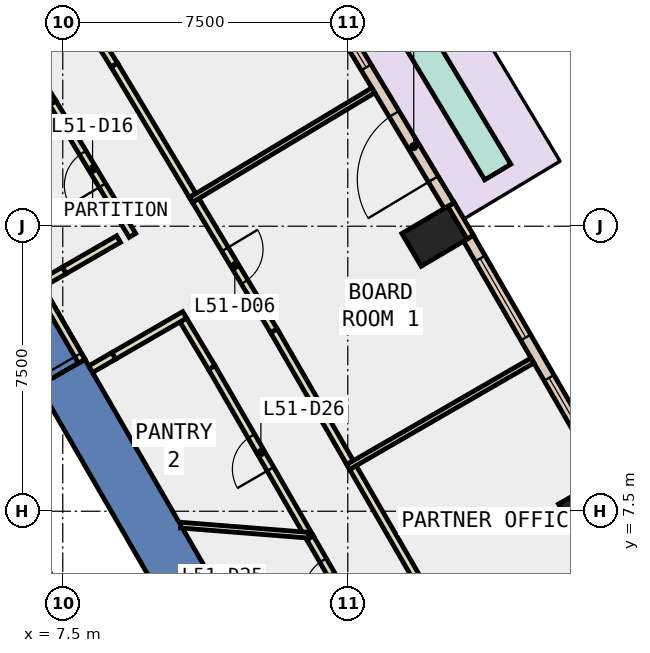
"""IFC4 building model, lengths in metres.
Left out: names, types, materials, properties, quantities, classifications, styles, units other than length and angle.
Written with IfcOpenShell. Run it as: python <this file> out.ifc"""

import sys

from ifc_helpers import new_model, si_unit, direction, frame, frame_2d, origin, origin_2d, place, context, subcontext, project, spatial, polyline, rectangle, outline, extrude, element, fill, save


model = new_model("IFC4")
c1 = context("Model", 3, precision=1e-05, world=origin(), true_north=direction((0.0, 1.0)))
c2 = subcontext(c1, "Body", "Model", "MODEL_VIEW")
j1 = project(units=[si_unit("LENGTHUNIT", "METRE"), si_unit("PLANEANGLEUNIT", "RADIAN")], contexts=[c1])
p1 = place(None, origin())
s1 = spatial("IfcSite", under=j1, at=p1, CompositionType="ELEMENT")
p2 = place(p1, origin())
s2 = spatial("IfcBuilding", under=s1, at=p2, CompositionType="ELEMENT")
p3 = place(p2, frame((0.0, 0.0, 227.6)))
s3 = spatial("IfcBuildingStorey", under=s2, at=p3, CompositionType="ELEMENT", Elevation=227.6)
for number, where, z_axis, x_axis in (
    (1, (21.4, 7.599, -0.4), (0.0, 0.0, 1.0), (-0.491, 0.871, 0.0)),
    (2, (17.28, 14.733, -0.4), (0.0, 0.0, 1.0), (-0.509, 0.861, 0.0)),
):
    element("IfcColumn", number, at=place(p3, frame(where, z_axis=z_axis, x_axis=x_axis)), inside=s3, PredefinedType="COLUMN", context=c2, shape_type="SweptSolid", body=[
        extrude(rectangle(XDim=1.0, YDim=1.4, at=origin_2d()), origin(), (0.0, 0.0, 1.0), 4.2),
    ])
p4 = place(p3, frame((0.0, 0.0, -0.4)))
e3 = element("IfcWall", 3, at=p4, inside=s3, PredefinedType="SHEAR", context=c2, shape_type="SweptSolid", body=[
    extrude(outline(polyline([(8.084, 11.498), (6.871, 10.798), (11.662, 2.5), (13.279, 2.5), (8.084, 11.498)])), origin(), (0.0, 0.0, 1.0), 4.2),
])
p5 = place(p3, frame((0.0, 0.0, 3.6)))
e4 = element("IfcWall", 4, at=p5, inside=s3, PredefinedType="SHEAR", context=c2, shape_type="SweptSolid", body=[
    extrude(outline(polyline([(7.084, 13.23), (5.871, 12.53), (6.871, 10.798), (8.084, 11.498), (7.084, 13.23)])), origin(), (0.0, 0.0, 1.0), 0.2),
])
p6 = place(p3, frame((18.223, 14.71, 0.0), z_axis=(0.0, 0.0, 1.0), x_axis=(-0.507980373775, 0.861368643416, 0.0)))
e5 = element("IfcWall", 5, at=p6, inside=s3, PredefinedType="STANDARD", context=c2, shape_type="SweptSolid", body=[
    extrude(rectangle(XDim=1.0, YDim=0.2, at=frame_2d((0.5, 0.0))), origin(), (0.0, 0.0, 1.0), 3.8),
])
p7 = place(p3, frame((21.804, 8.399, 0.0), z_axis=(0.0, 0.0, 1.0), x_axis=(-0.500075798504, 0.865981637075, 0.0)))
e6 = element("IfcWall", 6, at=p7, inside=s3, PredefinedType="STANDARD", context=c2, shape_type="SweptSolid", body=[
    extrude(rectangle(XDim=7.257, YDim=0.3, at=frame_2d((3.628, 0.0))), origin(), (0.0, 0.0, 1.0), 3.8),
])
p8 = place(p7, frame((0.614, 0.0, 0.9)))
e7 = element("IfcOpeningElement", 7, at=p8, cuts=e6, PredefinedType="OPENING", context=c2, shape_type="SweptSolid", body=[
    extrude(rectangle(XDim=2.4, YDim=2.6, at=frame_2d((1.2, 1.3))), frame((0.0, 0.16, 0.0), z_axis=(0.0, -1.0, 0.0), x_axis=(1.0, 0.0, 0.0)), (0.0, 0.0, 1.0), 0.32),
])
p9 = place(p7, frame((4.242, 0.0, 0.9)))
e8 = element("IfcOpeningElement", 8, at=p9, cuts=e6, PredefinedType="OPENING", context=c2, shape_type="SweptSolid", body=[
    extrude(rectangle(XDim=2.4, YDim=2.6, at=frame_2d((1.2, 1.3))), frame((0.0, 0.16, 0.0), z_axis=(0.0, -1.0, 0.0), x_axis=(1.0, 0.0, 0.0)), (0.0, 0.0, 1.0), 0.32),
])
p10 = place(p3, frame((17.669, 15.542, 0.0), z_axis=(0.0, 0.0, 1.0), x_axis=(-0.515049705348, 0.857160312323, 0.0)))
e9 = element("IfcWall", 9, at=p10, inside=s3, PredefinedType="STANDARD", context=c2, shape_type="SweptSolid", body=[
    extrude(rectangle(XDim=7.258, YDim=0.3, at=frame_2d((3.629, 0.0))), origin(), (0.0, 0.0, 1.0), 3.8),
])
p11 = place(p10, frame((0.814, 0.0, 0.0)))
e10 = element("IfcOpeningElement", 10, at=p11, cuts=e9, PredefinedType="OPENING", context=c2, shape_type="SweptSolid", body=[
    extrude(rectangle(XDim=2.0, YDim=2.4, at=frame_2d((1.0, 1.2))), frame((0.0, 0.16, 0.0), z_axis=(0.0, -1.0, 0.0), x_axis=(1.0, 0.0, 0.0)), (0.0, 0.0, 1.0), 0.32),
])
p12 = place(p10, frame((4.243, 0.0, 0.9)))
e11 = element("IfcOpeningElement", 11, at=p12, cuts=e9, PredefinedType="OPENING", context=c2, shape_type="SweptSolid", body=[
    extrude(rectangle(XDim=2.4, YDim=2.6, at=frame_2d((1.2, 1.3))), frame((0.0, 0.16, 0.0), z_axis=(0.0, -1.0, 0.0), x_axis=(1.0, 0.0, 0.0)), (0.0, 0.0, 1.0), 0.32),
])
p13 = place(p3, frame((18.946, 16.426, 0.0), z_axis=(0.0, 0.0, 1.0), x_axis=(-0.51495344021, 0.857218148674, 0.0)))
e12 = element("IfcWall", 12, at=p13, inside=s3, PredefinedType="STANDARD", context=c2, shape_type="SweptSolid", body=[
    extrude(rectangle(XDim=7.059, YDim=0.8, at=frame_2d((3.529, 0.0))), origin(), (0.0, 0.0, 1.0), 0.8),
])
p14 = place(p3, frame((15.194, 4.747, 0.0), z_axis=(0.0, 0.0, 1.0), x_axis=(-0.500140598757, 0.865944213836, 0.0)))
e13 = element("IfcWall", 13, at=p14, inside=s3, PredefinedType="PARTITIONING", context=c2, shape_type="SweptSolid", body=[
    extrude(rectangle(XDim=2.375, YDim=0.2, at=frame_2d((1.188, 0.0))), origin(), (0.0, 0.0, 1.0), 3.8),
])
p15 = place(p14, frame((0.688, 0.0, 0.0)))
e14 = element("IfcOpeningElement", 14, at=p15, cuts=e13, PredefinedType="OPENING", context=c2, shape_type="SweptSolid", body=[
    extrude(rectangle(XDim=1.0, YDim=2.1, at=frame_2d((0.5, 1.05))), frame((0.0, 0.11, 0.0), z_axis=(0.0, -1.0, 0.0), x_axis=(1.0, 0.0, 0.0)), (0.0, 0.0, 1.0), 0.22),
])
p16 = place(p3, frame((14.006, 6.804, 0.0), z_axis=(0.0, 0.0, 1.0), x_axis=(-0.500032993936, 0.866006353889, 0.0)))
e15 = element("IfcWall", 15, at=p16, inside=s3, PredefinedType="PARTITIONING", context=c2, shape_type="SweptSolid", body=[
    extrude(rectangle(XDim=5.172, YDim=0.2, at=frame_2d((2.586, 0.0))), origin(), (0.0, 0.0, 1.0), 3.8),
])
p17 = place(p16, frame((2.086, 0.0, 0.0)))
e16 = element("IfcOpeningElement", 16, at=p17, cuts=e15, PredefinedType="OPENING", context=c2, shape_type="SweptSolid", body=[
    extrude(rectangle(XDim=1.0, YDim=2.1, at=frame_2d((0.5, 1.05))), frame((0.0, 0.11, 0.0), z_axis=(0.0, -1.0, 0.0), x_axis=(1.0, 0.0, 0.0)), (0.0, 0.0, 1.0), 0.22),
])
p18 = place(p3, frame((11.42, 11.283, 0.0), z_axis=(0.0, 0.0, 1.0), x_axis=(-0.514890585899, 0.857255903772, 0.0)))
e17 = element("IfcWall", 17, at=p18, inside=s3, PredefinedType="PARTITIONING", context=c2, shape_type="SweptSolid", body=[
    extrude(rectangle(XDim=1.455, YDim=0.2, at=frame_2d((0.728, 0.0))), origin(), (0.0, 0.0, 1.0), 3.8),
])
p19 = place(p3, frame((10.706, 12.666, 0.0), z_axis=(0.0, 0.0, 1.0), x_axis=(-0.865862892194, -0.50028137275, 0.0)))
e18 = element("IfcWall", 18, at=p19, inside=s3, PredefinedType="PARTITIONING", context=c2, shape_type="SweptSolid", body=[
    extrude(rectangle(XDim=2.155, YDim=0.2, at=frame_2d((1.078, 0.0))), origin(), (0.0, 0.0, 1.0), 3.8),
])
p20 = place(p3, frame((6.935, 13.488, 0.0), z_axis=(0.0, 0.0, 1.0), x_axis=(0.866022890907, 0.500004352405, 0.0)))
e19 = element("IfcWall", 19, at=p20, inside=s3, PredefinedType="PARTITIONING", context=c2, shape_type="SweptSolid", body=[
    extrude(rectangle(XDim=0.7, YDim=0.2, at=frame_2d((0.35, 0.0))), origin(), (0.0, 0.0, 1.0), 2.4),
])
p21 = place(p3, frame((9.332, 14.759, 0.0), z_axis=(0.0, 0.0, 1.0), x_axis=(-0.514989912292, 0.857196237881, 0.0)))
e20 = element("IfcWall", 20, at=p21, inside=s3, PredefinedType="PARTITIONING", context=c2, shape_type="SweptSolid", body=[
    extrude(rectangle(XDim=4.068, YDim=0.2, at=frame_2d((2.034, 0.0))), origin(), (0.0, 0.0, 1.0), 3.8),
])
p22 = place(p21, frame((1.534, 0.0, 0.0)))
e21 = element("IfcOpeningElement", 21, at=p22, cuts=e20, PredefinedType="OPENING", context=c2, shape_type="SweptSolid", body=[
    extrude(rectangle(XDim=1.0, YDim=2.1, at=frame_2d((0.5, 1.05))), frame((0.0, 0.11, 0.0), z_axis=(0.0, -1.0, 0.0), x_axis=(1.0, 0.0, 0.0)), (0.0, 0.0, 1.0), 0.22),
])
p23 = place(p3, frame((7.237, 18.246, 0.0), z_axis=(0.0, 0.0, 1.0), x_axis=(-0.530175390862, 0.847887996686, 0.0)))
e22 = element("IfcWall", 22, at=p23, inside=s3, PredefinedType="PARTITIONING", context=c2, shape_type="SweptSolid", body=[
    extrude(rectangle(XDim=3.855, YDim=0.2, at=frame_2d((1.928, 0.0))), origin(), (0.0, 0.0, 1.0), 3.8),
])
p24 = place(p3, frame((15.135, 8.65, 0.0), z_axis=(0.0, 0.0, 1.0), x_axis=(0.500102734445, -0.865966081899, 0.0)))
e23 = element("IfcWall", 23, at=p24, inside=s3, PredefinedType="PARTITIONING", context=c2, shape_type="SweptSolid", body=[
    extrude(rectangle(XDim=4.001, YDim=0.2, at=frame_2d((2.0, 0.0))), origin(), (0.0, 0.0, 1.0), 3.8),
])
p25 = place(p3, frame((10.996, 15.679, 0.0), z_axis=(0.0, 0.0, 1.0), x_axis=(0.514800663461, -0.857309907152, 0.0)))
e24 = element("IfcWall", 24, at=p25, inside=s3, PredefinedType="PARTITIONING", context=c2, shape_type="SweptSolid", body=[
    extrude(rectangle(XDim=4.003, YDim=0.2, at=frame_2d((2.001, 0.0))), origin(), (0.0, 0.0, 1.0), 3.8),
])
p26 = place(p25, frame((1.502, 0.0, 0.0)))
e25 = element("IfcOpeningElement", 25, at=p26, cuts=e24, PredefinedType="OPENING", context=c2, shape_type="SweptSolid", body=[
    extrude(rectangle(XDim=1.0, YDim=2.1, at=frame_2d((0.5, 1.05))), frame((0.0, 0.11, 0.0), z_axis=(0.0, -1.0, 0.0), x_axis=(1.0, 0.0, 0.0)), (0.0, 0.0, 1.0), 0.22),
])
p27 = place(p3, frame((13.057, 12.247, 0.0), z_axis=(0.0, 0.0, 1.0), x_axis=(0.500093699572, -0.865971299552, 0.0)))
e26 = element("IfcWall", 26, at=p27, inside=s3, PredefinedType="PARTITIONING", context=c2, shape_type="SweptSolid", body=[
    extrude(rectangle(XDim=4.004, YDim=0.2, at=frame_2d((2.002, 0.0))), origin(), (0.0, 0.0, 1.0), 3.8),
])
p28 = place(p3, frame((4.593, 26.061, 0.0), z_axis=(0.0, 0.0, 1.0), x_axis=(0.530012579093, -0.847989779421, 0.0)))
e27 = element("IfcWall", 27, at=p28, inside=s3, PredefinedType="PARTITIONING", context=c2, shape_type="SweptSolid", body=[
    extrude(rectangle(XDim=8.045, YDim=0.2, at=frame_2d((4.022, 0.0))), origin(), (0.0, 0.0, 1.0), 3.8),
])
p29 = place(p28, frame((3.522, 0.0, 0.0)))
e28 = element("IfcOpeningElement", 28, at=p29, cuts=e27, PredefinedType="OPENING", context=c2, shape_type="SweptSolid", body=[
    extrude(rectangle(XDim=1.0, YDim=2.1, at=frame_2d((0.5, 1.05))), frame((0.0, 0.11, 0.0), z_axis=(0.0, -1.0, 0.0), x_axis=(1.0, 0.0, 0.0)), (0.0, 0.0, 1.0), 0.22),
])
p30 = place(p3, frame((8.857, 19.239, 0.0), z_axis=(0.0, 0.0, 1.0), x_axis=(0.514953174362, -0.857218308376, 0.0)))
e29 = element("IfcWall", 29, at=p30, inside=s3, PredefinedType="PARTITIONING", context=c2, shape_type="SweptSolid", body=[
    extrude(rectangle(XDim=4.002, YDim=0.2, at=frame_2d((2.001, 0.0))), origin(), (0.0, 0.0, 1.0), 3.8),
])
p31 = place(p3, frame((10.604, 7.135, 0.0), z_axis=(0.0, 0.0, 1.0), x_axis=(0.996887536909, -0.07883678555, 0.0)))
e30 = element("IfcWall", 30, at=p31, inside=s3, PredefinedType="PARTITIONING", context=c2, shape_type="SweptSolid", body=[
    extrude(rectangle(XDim=3.375, YDim=0.15, at=frame_2d((1.688, 0.0))), origin(), (0.0, 0.0, 1.0), 3.8),
])
p32 = place(p3, frame((15.01, 8.665, 0.0), z_axis=(0.0, 0.0, 1.0), x_axis=(0.865961984968, 0.500109828528, 0.0)))
e31 = element("IfcWall", 31, at=p32, inside=s3, PredefinedType="PARTITIONING", context=c2, shape_type="SweptSolid", body=[
    extrude(rectangle(XDim=5.601, YDim=0.15, at=frame_2d((2.8, 0.0))), origin(), (0.0, 0.0, 1.0), 3.8),
])
p33 = place(p3, frame((10.871, 15.692, 0.0), z_axis=(0.0, 0.0, 1.0), x_axis=(0.857165756431, 0.515040645001, 0.0)))
e32 = element("IfcWall", 32, at=p33, inside=s3, PredefinedType="PARTITIONING", context=c2, shape_type="SweptSolid", body=[
    extrude(rectangle(XDim=5.6, YDim=0.15, at=frame_2d((2.8, 0.0))), origin(), (0.0, 0.0, 1.0), 3.8),
])
p34 = place(p3, frame((7.997, 11.448, 0.0), z_axis=(0.0, 0.0, 1.0), x_axis=(-0.50002537861, 0.866010750942, 0.0)))
e33 = element("IfcWall", 33, at=p34, inside=s3, PredefinedType="PARTITIONING", context=c2, shape_type="SweptSolid", body=[
    extrude(rectangle(XDim=2.0, YDim=0.2, at=frame_2d((1.0, 0.0))), origin(), (0.0, 0.0, 1.0), 2.4),
])
p35 = place(p34, frame((0.19, 0.0, 0.0)))
e34 = element("IfcOpeningElement", 34, at=p35, cuts=e33, PredefinedType="OPENING", context=c2, shape_type="SweptSolid", body=[
    extrude(rectangle(XDim=1.8, YDim=2.1, at=frame_2d((0.9, 1.05))), frame((0.0, 0.11, 0.0), z_axis=(0.0, -1.0, 0.0), x_axis=(1.0, 0.0, 0.0)), (0.0, 0.0, 1.0), 0.22),
])
p36 = place(p3, frame((8.84, 11.588, 0.0), z_axis=(0.0, 0.0, 1.0), x_axis=(-0.866110083249, -0.499853302173, 0.0)))
e35 = element("IfcWall", 35, at=p36, inside=s3, PredefinedType="PARTITIONING", context=c2, shape_type="SweptSolid", body=[
    extrude(rectangle(XDim=0.7, YDim=0.2, at=frame_2d((0.35, 0.0))), origin(), (0.0, 0.0, 1.0), 2.4),
])
p37 = place(p3, frame((7.541, 13.838, 0.0), z_axis=(0.0, 0.0, 1.0), x_axis=(0.86593636949, 0.500154180222, 0.0)))
e36 = element("IfcWall", 36, at=p37, inside=s3, PredefinedType="PARTITIONING", context=c2, shape_type="SweptSolid", body=[
    extrude(rectangle(XDim=1.648, YDim=0.2, at=frame_2d((0.824, 0.0))), origin(), (0.0, 0.0, 1.0), 3.8),
])
p38 = place(p3, frame((8.48, 3.412, 0.0), z_axis=(0.0, 0.0, 1.0), x_axis=(-0.499978703459, 0.866037698999, 0.0)))
e37 = element("IfcWall", 37, at=p38, inside=s3, PredefinedType="STANDARD", context=c2, shape_type="SweptSolid", body=[
    extrude(rectangle(XDim=6.9, YDim=0.2, at=frame_2d((3.45, 0.0))), origin(), (0.0, 0.0, 1.0), 3.8),
])
p39 = place(p8, origin())
e38 = element("IfcWindow", 38, at=p39, inside=s3, PartitioningType="SINGLE_PANEL", PredefinedType="WINDOW", context=c2, shape_type="SweptSolid", body=[
    extrude(rectangle(XDim=2.4, YDim=2.6, at=frame_2d((1.2, 1.3))), frame((0.0, 0.03, 0.0), z_axis=(0.0, -1.0, 0.0), x_axis=(1.0, 0.0, 0.0)), (0.0, 0.0, 1.0), 0.06),
])
fill(e7, e38)
p40 = place(p9, origin())
e39 = element("IfcWindow", 39, at=p40, inside=s3, PartitioningType="SINGLE_PANEL", PredefinedType="WINDOW", context=c2, shape_type="SweptSolid", body=[
    extrude(rectangle(XDim=2.4, YDim=2.6, at=frame_2d((1.2, 1.3))), frame((0.0, 0.03, 0.0), z_axis=(0.0, -1.0, 0.0), x_axis=(1.0, 0.0, 0.0)), (0.0, 0.0, 1.0), 0.06),
])
fill(e8, e39)
p41 = place(p11, origin())
e40 = element("IfcDoor", 40, at=p41, inside=s3, OperationType="SLIDING_TO_LEFT", PredefinedType="DOOR", context=c2, shape_type="SweptSolid", body=[
    extrude(rectangle(XDim=2.0, YDim=2.4, at=frame_2d((1.0, 1.2))), frame((0.0, 0.025, 0.0), z_axis=(0.0, -1.0, 0.0), x_axis=(1.0, 0.0, 0.0)), (0.0, 0.0, 1.0), 0.05),
])
fill(e10, e40)
p42 = place(p12, origin())
e41 = element("IfcWindow", 41, at=p42, inside=s3, PartitioningType="SINGLE_PANEL", PredefinedType="WINDOW", context=c2, shape_type="SweptSolid", body=[
    extrude(rectangle(XDim=2.4, YDim=2.6, at=frame_2d((1.2, 1.3))), frame((0.0, 0.03, 0.0), z_axis=(0.0, -1.0, 0.0), x_axis=(1.0, 0.0, 0.0)), (0.0, 0.0, 1.0), 0.06),
])
fill(e11, e41)
p43 = place(p26, origin())
e42 = element("IfcDoor", 42, at=p43, inside=s3, OperationType="SINGLE_SWING_LEFT", PredefinedType="DOOR", context=c2, shape_type="SweptSolid", body=[
    extrude(rectangle(XDim=1.0, YDim=2.1, at=frame_2d((0.5, 1.05))), frame((0.0, 0.025, 0.0), z_axis=(0.0, -1.0, 0.0), x_axis=(1.0, 0.0, 0.0)), (0.0, 0.0, 1.0), 0.05),
])
fill(e25, e42)
p44 = place(p22, origin())
e43 = element("IfcDoor", 43, at=p44, inside=s3, OperationType="SINGLE_SWING_LEFT", PredefinedType="DOOR", context=c2, shape_type="SweptSolid", body=[
    extrude(rectangle(XDim=1.0, YDim=2.1, at=frame_2d((0.5, 1.05))), frame((0.0, 0.025, 0.0), z_axis=(0.0, -1.0, 0.0), x_axis=(1.0, 0.0, 0.0)), (0.0, 0.0, 1.0), 0.05),
])
fill(e21, e43)
p45 = place(p15, origin())
e44 = element("IfcDoor", 44, at=p45, inside=s3, OperationType="SINGLE_SWING_LEFT", PredefinedType="DOOR", context=c2, shape_type="SweptSolid", body=[
    extrude(rectangle(XDim=1.0, YDim=2.1, at=frame_2d((0.5, 1.05))), frame((0.0, 0.025, 0.0), z_axis=(0.0, -1.0, 0.0), x_axis=(1.0, 0.0, 0.0)), (0.0, 0.0, 1.0), 0.05),
])
fill(e14, e44)
p46 = place(p17, origin())
e45 = element("IfcDoor", 45, at=p46, inside=s3, OperationType="SINGLE_SWING_LEFT", PredefinedType="DOOR", context=c2, shape_type="SweptSolid", body=[
    extrude(rectangle(XDim=1.0, YDim=2.1, at=frame_2d((0.5, 1.05))), frame((0.0, 0.025, 0.0), z_axis=(0.0, -1.0, 0.0), x_axis=(1.0, 0.0, 0.0)), (0.0, 0.0, 1.0), 0.05),
])
fill(e16, e45)
p47 = place(p35, origin())
e46 = element("IfcDoor", 46, at=p47, inside=s3, OperationType="DOUBLE_DOOR_SINGLE_SWING", PredefinedType="DOOR", context=c2, shape_type="SweptSolid", body=[
    extrude(rectangle(XDim=1.8, YDim=2.1, at=frame_2d((0.9, 1.05))), frame((0.0, 0.025, 0.0), z_axis=(0.0, -1.0, 0.0), x_axis=(1.0, 0.0, 0.0)), (0.0, 0.0, 1.0), 0.05),
])
fill(e34, e46)
save(model, sys.argv[1])
